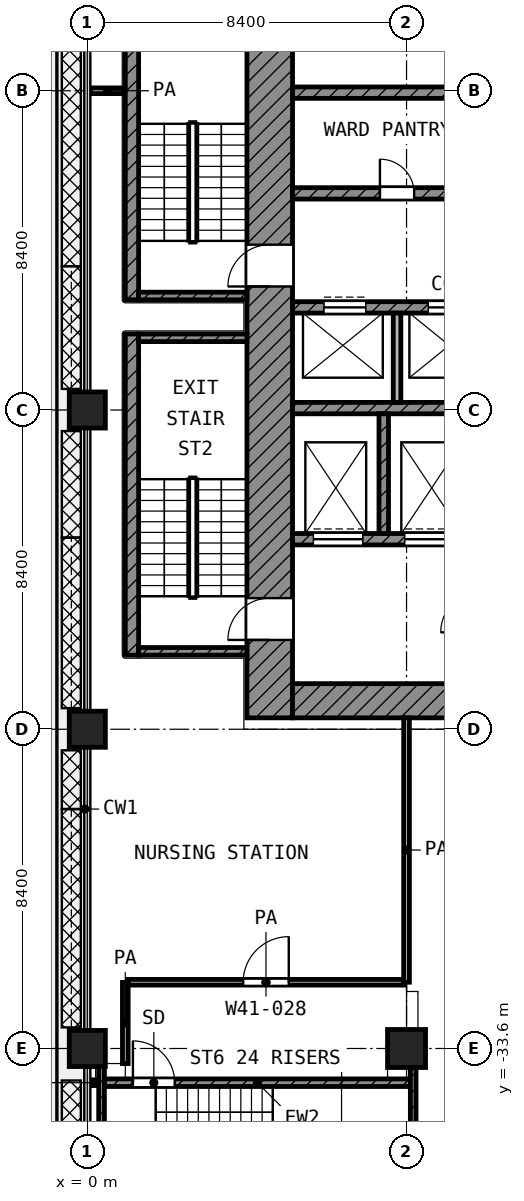
"""IFC4 building model, lengths in metres.
Left out: names, types, materials, properties, quantities, classifications, styles, units other than length and angle.
Written with IfcOpenShell. Run it as: python <this file> out.ifc"""

import sys

from ifc_helpers import new_model, si_unit, direction, frame, frame_2d, origin, origin_2d, place, context, subcontext, project, spatial, rectangle, extrude, element, fill, save


model = new_model("IFC4")
c1 = context("Model", 3, precision=1e-05, world=origin(), true_north=direction((0.0, 1.0)))
c2 = subcontext(c1, "Body", "Model", "MODEL_VIEW")
j1 = project(units=[si_unit("LENGTHUNIT", "METRE"), si_unit("PLANEANGLEUNIT", "RADIAN")], contexts=[c1])
p1 = place(None, origin())
s1 = spatial("IfcSite", under=j1, at=p1, CompositionType="ELEMENT")
p2 = place(p1, origin())
s2 = spatial("IfcBuilding", under=s1, at=p2, CompositionType="ELEMENT")
p3 = place(p2, frame((0.0, 0.0, 200.4)))
s3 = spatial("IfcBuildingStorey", under=s2, at=p3, CompositionType="ELEMENT", Elevation=200.4)
for number, where, z_axis, x_axis in (
    (1, (0.0, -16.8, 0.0), (0.0, 0.0, 1.0), (1.0, 0.0, 0.0)),
    (2, (0.0, -25.2, 0.0), (0.0, 0.0, 1.0), (1.0, 0.0, 0.0)),
    (3, (0.0, -33.6, 0.0), (0.0, 0.0, 1.0), (1.0, 0.0, 0.0)),
):
    element("IfcColumn", number, at=place(p3, frame(where, z_axis=z_axis, x_axis=x_axis)), inside=s3, PredefinedType="COLUMN", context=c2, shape_type="SweptSolid", body=[
        extrude(rectangle(XDim=0.95, YDim=0.95, at=origin_2d()), origin(), (0.0, 0.0, 1.0), 4.2),
    ])
p4 = place(p3, frame((8.4, -33.6, 0.0), z_axis=(0.0, 0.0, 1.0), x_axis=(1.0, 0.0, 0.0)))
e4 = element("IfcColumn", 4, at=p4, inside=s3, PredefinedType="COLUMN", context=c2, shape_type="SweptSolid", body=[
    extrude(rectangle(XDim=1.0, YDim=1.0, at=origin_2d()), origin(), (0.0, 0.0, 1.0), 4.2),
])
p5 = place(p3, frame((4.8, -24.9, 0.0), z_axis=(0.0, 0.0, 1.0), x_axis=(0.0, 1.0, 0.0)))
e5 = element("IfcWall", 5, at=p5, inside=s3, PredefinedType="SHEAR", context=c2, shape_type="SweptSolid", body=[
    extrude(rectangle(XDim=19.5, YDim=1.2, at=frame_2d((9.75, 0.0))), origin(), (0.0, 0.0, 1.0), 3.6),
])
p6 = place(p5, frame((11.35, 0.0, 0.0)))
e6 = element("IfcOpeningElement", 6, at=p6, cuts=e5, PredefinedType="OPENING", context=c2, shape_type="SweptSolid", body=[
    extrude(rectangle(XDim=1.1, YDim=2.1, at=frame_2d((0.55, 1.05))), frame((0.0, 0.61, 0.0), z_axis=(0.0, -1.0, 0.0), x_axis=(1.0, 0.0, 0.0)), (0.0, 0.0, 1.0), 1.22),
])
p7 = place(p5, frame((2.05, 0.0, 0.0)))
e7 = element("IfcOpeningElement", 7, at=p7, cuts=e5, PredefinedType="OPENING", context=c2, shape_type="SweptSolid", body=[
    extrude(rectangle(XDim=1.1, YDim=2.1, at=frame_2d((0.55, 1.05))), frame((0.0, 0.61, 0.0), z_axis=(0.0, -1.0, 0.0), x_axis=(1.0, 0.0, 0.0)), (0.0, 0.0, 1.0), 1.22),
])
p8 = place(p3, frame((5.4, -24.45, 0.0), z_axis=(0.0, 0.0, 1.0), x_axis=(1.0, 0.0, 0.0)))
e8 = element("IfcWall", 8, at=p8, inside=s3, PredefinedType="SHEAR", context=c2, shape_type="SweptSolid", body=[
    extrude(rectangle(XDim=18.6, YDim=0.9, at=frame_2d((9.3, 0.0))), origin(), (0.0, 0.0, 1.0), 3.6),
])
p9 = place(p8, frame((6.3, 0.0, 0.0)))
e9 = element("IfcOpeningElement", 9, at=p9, cuts=e8, PredefinedType="OPENING", context=c2, shape_type="SweptSolid", body=[
    extrude(rectangle(XDim=1.8, YDim=2.1, at=frame_2d((0.9, 1.05))), frame((0.0, 0.46, 0.0), z_axis=(0.0, -1.0, 0.0), x_axis=(1.0, 0.0, 0.0)), (0.0, 0.0, 1.0), 0.92),
])
p10 = place(p3, frame((5.4, -8.45, 0.0), z_axis=(0.0, 0.0, 1.0), x_axis=(1.0, 0.0, 0.0)))
e10 = element("IfcWall", 10, at=p10, inside=s3, PredefinedType="SHEAR", context=c2, shape_type="SweptSolid", body=[
    extrude(rectangle(XDim=16.65, YDim=0.3, at=frame_2d((8.325, 0.0))), origin(), (0.0, 0.0, 1.0), 3.6),
])
p11 = place(p3, frame((5.4, -11.1, 0.0), z_axis=(0.0, 0.0, 1.0), x_axis=(1.0, 0.0, 0.0)))
e11 = element("IfcWall", 11, at=p11, inside=s3, PredefinedType="SHEAR", context=c2, shape_type="SweptSolid", body=[
    extrude(rectangle(XDim=16.65, YDim=0.3, at=frame_2d((8.325, 0.0))), origin(), (0.0, 0.0, 1.0), 3.6),
])
p12 = place(p11, frame((11.825, 0.0, 0.0)))
e12 = element("IfcOpeningElement", 12, at=p12, cuts=e11, PredefinedType="OPENING", context=c2, shape_type="SweptSolid", body=[
    extrude(rectangle(XDim=1.1, YDim=2.1, at=frame_2d((0.55, 1.05))), frame((0.0, 0.16, 0.0), z_axis=(0.0, -1.0, 0.0), x_axis=(1.0, 0.0, 0.0)), (0.0, 0.0, 1.0), 0.32),
])
p13 = place(p11, frame((14.575, 0.0, 0.0)))
e13 = element("IfcOpeningElement", 13, at=p13, cuts=e11, PredefinedType="OPENING", context=c2, shape_type="SweptSolid", body=[
    extrude(rectangle(XDim=1.1, YDim=2.1, at=frame_2d((0.55, 1.05))), frame((0.0, 0.16, 0.0), z_axis=(0.0, -1.0, 0.0), x_axis=(1.0, 0.0, 0.0)), (0.0, 0.0, 1.0), 0.32),
])
p14 = place(p11, frame((2.3, 0.0, 0.0)))
e14 = element("IfcOpeningElement", 14, at=p14, cuts=e11, PredefinedType="OPENING", context=c2, shape_type="SweptSolid", body=[
    extrude(rectangle(XDim=0.9, YDim=2.1, at=frame_2d((0.45, 1.05))), frame((0.0, 0.16, 0.0), z_axis=(0.0, -1.0, 0.0), x_axis=(1.0, 0.0, 0.0)), (0.0, 0.0, 1.0), 0.32),
])
p15 = place(p11, frame((7.8, 0.0, 0.0)))
e15 = element("IfcOpeningElement", 15, at=p15, cuts=e11, PredefinedType="OPENING", context=c2, shape_type="SweptSolid", body=[
    extrude(rectangle(XDim=0.9, YDim=2.1, at=frame_2d((0.45, 1.05))), frame((0.0, 0.16, 0.0), z_axis=(0.0, -1.0, 0.0), x_axis=(1.0, 0.0, 0.0)), (0.0, 0.0, 1.0), 0.32),
])
p16 = place(p3, frame((5.4, -14.1, 0.0), z_axis=(0.0, 0.0, 1.0), x_axis=(1.0, 0.0, 0.0)))
e16 = element("IfcWall", 16, at=p16, inside=s3, PredefinedType="SHEAR", context=c2, shape_type="SweptSolid", body=[
    extrude(rectangle(XDim=16.65, YDim=0.3, at=frame_2d((8.325, 0.0))), origin(), (0.0, 0.0, 1.0), 3.6),
])
p17 = place(p16, frame((0.825, 0.0, 0.0)))
e17 = element("IfcOpeningElement", 17, at=p17, cuts=e16, PredefinedType="OPENING", context=c2, shape_type="SweptSolid", body=[
    extrude(rectangle(XDim=1.1, YDim=2.1, at=frame_2d((0.55, 1.05))), frame((0.0, 0.16, 0.0), z_axis=(0.0, -1.0, 0.0), x_axis=(1.0, 0.0, 0.0)), (0.0, 0.0, 1.0), 0.32),
])
p18 = place(p16, frame((3.575, 0.0, 0.0)))
e18 = element("IfcOpeningElement", 18, at=p18, cuts=e16, PredefinedType="OPENING", context=c2, shape_type="SweptSolid", body=[
    extrude(rectangle(XDim=1.1, YDim=2.1, at=frame_2d((0.55, 1.05))), frame((0.0, 0.16, 0.0), z_axis=(0.0, -1.0, 0.0), x_axis=(1.0, 0.0, 0.0)), (0.0, 0.0, 1.0), 0.32),
])
p19 = place(p3, frame((5.4, -16.75, 0.0), z_axis=(0.0, 0.0, 1.0), x_axis=(1.0, 0.0, 0.0)))
e19 = element("IfcWall", 19, at=p19, inside=s3, PredefinedType="SHEAR", context=c2, shape_type="SweptSolid", body=[
    extrude(rectangle(XDim=16.65, YDim=0.3, at=frame_2d((8.325, 0.0))), origin(), (0.0, 0.0, 1.0), 3.6),
])
p20 = place(p3, frame((5.4, -20.2, 0.0), z_axis=(0.0, 0.0, 1.0), x_axis=(1.0, 0.0, 0.0)))
e20 = element("IfcWall", 20, at=p20, inside=s3, PredefinedType="SHEAR", context=c2, shape_type="SweptSolid", body=[
    extrude(rectangle(XDim=14.65, YDim=0.3, at=frame_2d((7.325, 0.0))), origin(), (0.0, 0.0, 1.0), 3.6),
])
p21 = place(p20, frame((10.55, 0.0, 0.0)))
e21 = element("IfcOpeningElement", 21, at=p21, cuts=e20, PredefinedType="OPENING", context=c2, shape_type="SweptSolid", body=[
    extrude(rectangle(XDim=1.3, YDim=2.1, at=frame_2d((0.65, 1.05))), frame((0.0, 0.16, 0.0), z_axis=(0.0, -1.0, 0.0), x_axis=(1.0, 0.0, 0.0)), (0.0, 0.0, 1.0), 0.32),
])
p22 = place(p20, frame((12.95, 0.0, 0.0)))
e22 = element("IfcOpeningElement", 22, at=p22, cuts=e20, PredefinedType="OPENING", context=c2, shape_type="SweptSolid", body=[
    extrude(rectangle(XDim=1.3, YDim=2.1, at=frame_2d((0.65, 1.05))), frame((0.0, 0.16, 0.0), z_axis=(0.0, -1.0, 0.0), x_axis=(1.0, 0.0, 0.0)), (0.0, 0.0, 1.0), 0.32),
])
p23 = place(p20, frame((0.55, 0.0, 0.0)))
e23 = element("IfcOpeningElement", 23, at=p23, cuts=e20, PredefinedType="OPENING", context=c2, shape_type="SweptSolid", body=[
    extrude(rectangle(XDim=1.3, YDim=2.1, at=frame_2d((0.65, 1.05))), frame((0.0, 0.16, 0.0), z_axis=(0.0, -1.0, 0.0), x_axis=(1.0, 0.0, 0.0)), (0.0, 0.0, 1.0), 0.32),
])
p24 = place(p20, frame((2.95, 0.0, 0.0)))
e24 = element("IfcOpeningElement", 24, at=p24, cuts=e20, PredefinedType="OPENING", context=c2, shape_type="SweptSolid", body=[
    extrude(rectangle(XDim=1.3, YDim=2.1, at=frame_2d((0.65, 1.05))), frame((0.0, 0.16, 0.0), z_axis=(0.0, -1.0, 0.0), x_axis=(1.0, 0.0, 0.0)), (0.0, 0.0, 1.0), 0.32),
])
p25 = place(p20, frame((6.55, 0.0, 0.0)))
e25 = element("IfcOpeningElement", 25, at=p25, cuts=e20, PredefinedType="OPENING", context=c2, shape_type="SweptSolid", body=[
    extrude(rectangle(XDim=0.9, YDim=2.1, at=frame_2d((0.45, 1.05))), frame((0.0, 0.16, 0.0), z_axis=(0.0, -1.0, 0.0), x_axis=(1.0, 0.0, 0.0)), (0.0, 0.0, 1.0), 0.32),
])
p26 = place(p20, frame((8.95, 0.0, 0.0)))
e26 = element("IfcOpeningElement", 26, at=p26, cuts=e20, PredefinedType="OPENING", context=c2, shape_type="SweptSolid", body=[
    extrude(rectangle(XDim=0.9, YDim=2.1, at=frame_2d((0.45, 1.05))), frame((0.0, 0.16, 0.0), z_axis=(0.0, -1.0, 0.0), x_axis=(1.0, 0.0, 0.0)), (0.0, 0.0, 1.0), 0.32),
])
p27 = place(p3, frame((7.8, -20.05, 0.0), z_axis=(0.0, 0.0, 1.0), x_axis=(0.0, 1.0, 0.0)))
e27 = element("IfcWall", 27, at=p27, inside=s3, PredefinedType="SHEAR", context=c2, shape_type="SweptSolid", body=[
    extrude(rectangle(XDim=3.15, YDim=0.25, at=frame_2d((1.575, 0.0))), origin(), (0.0, 0.0, 1.0), 3.6),
])
p28 = place(p3, frame((8.15, -16.6, 0.0), z_axis=(0.0, 0.0, 1.0), x_axis=(0.0, 1.0, 0.0)))
e28 = element("IfcWall", 28, at=p28, inside=s3, PredefinedType="PARTITIONING", context=c2, shape_type="SweptSolid", body=[
    extrude(rectangle(XDim=2.35, YDim=0.2, at=frame_2d((1.175, 0.0))), origin(), (0.0, 0.0, 1.0), 3.6),
])
p29 = place(p3, frame((1.175, -13.9, 0.0), z_axis=(0.0, 0.0, 1.0), x_axis=(0.0, 1.0, 0.0)))
e29 = element("IfcWall", 29, at=p29, inside=s3, PredefinedType="SHEAR", context=c2, shape_type="SweptSolid", body=[
    extrude(rectangle(XDim=8.45, YDim=0.35, at=frame_2d((4.225, 0.0))), origin(), (0.0, 0.0, 1.0), 3.6),
])
p30 = place(p3, frame((1.35, -13.8, 0.0), z_axis=(0.0, 0.0, 1.0), x_axis=(1.0, 0.0, 0.0)))
e30 = element("IfcWall", 30, at=p30, inside=s3, PredefinedType="SHEAR", context=c2, shape_type="SweptSolid", body=[
    extrude(rectangle(XDim=2.85, YDim=0.2, at=frame_2d((1.425, 0.0))), origin(), (0.0, 0.0, 1.0), 3.6),
])
p31 = place(p3, frame((1.175, -23.25, 0.0), z_axis=(0.0, 0.0, 1.0), x_axis=(0.0, 1.0, 0.0)))
e31 = element("IfcWall", 31, at=p31, inside=s3, PredefinedType="SHEAR", context=c2, shape_type="SweptSolid", body=[
    extrude(rectangle(XDim=8.45, YDim=0.35, at=frame_2d((4.225, 0.0))), origin(), (0.0, 0.0, 1.0), 3.6),
])
for number, where, z_axis, x_axis in (
    (32, (1.35, -14.9, 0.0), (0.0, 0.0, 1.0), (1.0, 0.0, 0.0)),
    (33, (1.35, -23.15, 0.0), (0.0, 0.0, 1.0), (1.0, 0.0, 0.0)),
):
    element("IfcWall", number, at=place(p3, frame(where, z_axis=z_axis, x_axis=x_axis)), inside=s3, PredefinedType="SHEAR", context=c2, shape_type="SweptSolid", body=[
        extrude(rectangle(XDim=2.85, YDim=0.2, at=frame_2d((1.425, 0.0))), origin(), (0.0, 0.0, 1.0), 3.6),
    ])
p32 = place(p3, frame((0.375, -40.05, 0.0), z_axis=(0.0, 0.0, 1.0), x_axis=(0.0, 1.0, 0.0)))
e34 = element("IfcWall", 34, at=p32, inside=s3, PredefinedType="SHEAR", context=c2, shape_type="SweptSolid", body=[
    extrude(rectangle(XDim=5.975, YDim=0.15, at=frame_2d((2.988, 0.0))), origin(), (0.0, 0.0, 1.0), 3.6),
])
p33 = place(p3, frame((8.575, -40.05, 0.0), z_axis=(0.0, 0.0, 1.0), x_axis=(0.0, 1.0, 0.0)))
e35 = element("IfcWall", 35, at=p33, inside=s3, PredefinedType="SHEAR", context=c2, shape_type="SweptSolid", body=[
    extrude(rectangle(XDim=5.95, YDim=0.15, at=frame_2d((2.975, 0.0))), origin(), (0.0, 0.0, 1.0), 3.6),
])
p34 = place(p3, frame((0.45, -34.5, 0.0), z_axis=(0.0, 0.0, 1.0), x_axis=(1.0, 0.0, 0.0)))
e36 = element("IfcWall", 36, at=p34, inside=s3, PredefinedType="SHEAR", context=c2, shape_type="SweptSolid", body=[
    extrude(rectangle(XDim=8.05, YDim=0.2, at=frame_2d((4.025, 0.0))), origin(), (0.0, 0.0, 1.0), 3.6),
])
p35 = place(p34, frame((0.75, 0.0, 0.0)))
e37 = element("IfcOpeningElement", 37, at=p35, cuts=e36, PredefinedType="OPENING", context=c2, shape_type="SweptSolid", body=[
    extrude(rectangle(XDim=1.1, YDim=2.1, at=frame_2d((0.55, 1.05))), frame((0.0, 0.11, 0.0), z_axis=(0.0, -1.0, 0.0), x_axis=(1.0, 0.0, 0.0)), (0.0, 0.0, 1.0), 0.22),
])
p36 = place(p3, frame((0.08, -34.5, 0.0), z_axis=(0.0, 0.0, 1.0), x_axis=(1.0, 0.0, 0.0)))
e38 = element("IfcWall", 38, at=p36, inside=s3, PredefinedType="PARTITIONING", context=c2, shape_type="SweptSolid", body=[
    extrude(rectangle(XDim=0.19, YDim=0.15, at=frame_2d((0.095, 0.0))), origin(), (0.0, 0.0, 1.0), 3.6),
])
p37 = place(p3, frame((1.077, -31.857, 0.0), z_axis=(0.0, 0.0, 1.0), x_axis=(1.0, 0.0, 0.0)))
e39 = element("IfcWall", 39, at=p37, inside=s3, PredefinedType="PARTITIONING", context=c2, shape_type="SweptSolid", body=[
    extrude(rectangle(XDim=7.248, YDim=0.15, at=frame_2d((3.624, 0.0))), origin(), (0.0, 0.0, 1.0), 3.6),
])
p38 = place(p37, frame((3.024, 0.0, 0.0)))
e40 = element("IfcOpeningElement", 40, at=p38, cuts=e39, PredefinedType="OPENING", context=c2, shape_type="SweptSolid", body=[
    extrude(rectangle(XDim=1.2, YDim=2.1, at=frame_2d((0.6, 1.05))), frame((0.0, 0.085, 0.0), z_axis=(0.0, -1.0, 0.0), x_axis=(1.0, 0.0, 0.0)), (0.0, 0.0, 1.0), 0.17),
])
p39 = place(p3, frame((0.08, -8.4, 0.0), z_axis=(0.0, 0.0, 1.0), x_axis=(1.0, 0.0, 0.0)))
e41 = element("IfcWall", 41, at=p39, inside=s3, PredefinedType="PARTITIONING", context=c2, shape_type="SweptSolid", body=[
    extrude(rectangle(XDim=0.89, YDim=0.15, at=frame_2d((0.445, 0.0))), origin(), (0.0, 0.0, 1.0), 3.6),
])
p40 = place(p3, frame((1.0, -33.997, 0.0), z_axis=(0.0, 0.0, 1.0), x_axis=(0.0, 1.0, 0.0)))
e42 = element("IfcWall", 42, at=p40, inside=s3, PredefinedType="PARTITIONING", context=c2, shape_type="SweptSolid", body=[
    extrude(rectangle(XDim=2.136, YDim=0.15, at=frame_2d((1.068, 0.0))), origin(), (0.0, 0.0, 1.0), 3.6),
])
p41 = place(p3, frame((8.4, -31.857, 0.0), z_axis=(0.0, 0.0, 1.0), x_axis=(0.0, 1.0, 0.0)))
e43 = element("IfcWall", 43, at=p41, inside=s3, PredefinedType="PARTITIONING", context=c2, shape_type="SweptSolid", body=[
    extrude(rectangle(XDim=6.957, YDim=0.15, at=frame_2d((3.479, 0.0))), origin(), (0.0, 0.0, 1.0), 3.6),
])
p42 = place(p17, origin())
e44 = element("IfcDoor", 44, at=p42, inside=s3, OperationType="DOUBLE_DOOR_SLIDING", PredefinedType="DOOR", context=c2, shape_type="SweptSolid", body=[
    extrude(rectangle(XDim=1.1, YDim=2.1, at=frame_2d((0.55, 1.05))), frame((0.0, 0.025, 0.0), z_axis=(0.0, -1.0, 0.0), x_axis=(1.0, 0.0, 0.0)), (0.0, 0.0, 1.0), 0.05),
])
fill(e17, e44)
p43 = place(p18, origin())
e45 = element("IfcDoor", 45, at=p43, inside=s3, OperationType="DOUBLE_DOOR_SLIDING", PredefinedType="DOOR", context=c2, shape_type="SweptSolid", body=[
    extrude(rectangle(XDim=1.1, YDim=2.1, at=frame_2d((0.55, 1.05))), frame((0.0, 0.025, 0.0), z_axis=(0.0, -1.0, 0.0), x_axis=(1.0, 0.0, 0.0)), (0.0, 0.0, 1.0), 0.05),
])
fill(e18, e45)
p44 = place(p23, origin())
e46 = element("IfcDoor", 46, at=p44, inside=s3, OperationType="DOUBLE_DOOR_SLIDING", PredefinedType="DOOR", context=c2, shape_type="SweptSolid", body=[
    extrude(rectangle(XDim=1.3, YDim=2.1, at=frame_2d((0.65, 1.05))), frame((0.0, 0.025, 0.0), z_axis=(0.0, -1.0, 0.0), x_axis=(1.0, 0.0, 0.0)), (0.0, 0.0, 1.0), 0.05),
])
fill(e23, e46)
p45 = place(p24, origin())
e47 = element("IfcDoor", 47, at=p45, inside=s3, OperationType="DOUBLE_DOOR_SLIDING", PredefinedType="DOOR", context=c2, shape_type="SweptSolid", body=[
    extrude(rectangle(XDim=1.3, YDim=2.1, at=frame_2d((0.65, 1.05))), frame((0.0, 0.025, 0.0), z_axis=(0.0, -1.0, 0.0), x_axis=(1.0, 0.0, 0.0)), (0.0, 0.0, 1.0), 0.05),
])
fill(e24, e47)
p46 = place(p6, origin())
e48 = element("IfcDoor", 48, at=p46, inside=s3, OperationType="SINGLE_SWING_LEFT", PredefinedType="DOOR", context=c2, shape_type="SweptSolid", body=[
    extrude(rectangle(XDim=1.1, YDim=2.1, at=frame_2d((0.55, 1.05))), frame((0.0, 0.025, 0.0), z_axis=(0.0, -1.0, 0.0), x_axis=(1.0, 0.0, 0.0)), (0.0, 0.0, 1.0), 0.05),
])
fill(e6, e48)
p47 = place(p7, origin())
e49 = element("IfcDoor", 49, at=p47, inside=s3, OperationType="SINGLE_SWING_LEFT", PredefinedType="DOOR", context=c2, shape_type="SweptSolid", body=[
    extrude(rectangle(XDim=1.1, YDim=2.1, at=frame_2d((0.55, 1.05))), frame((0.0, 0.025, 0.0), z_axis=(0.0, -1.0, 0.0), x_axis=(1.0, 0.0, 0.0)), (0.0, 0.0, 1.0), 0.05),
])
fill(e7, e49)
p48 = place(p14, origin())
e50 = element("IfcDoor", 50, at=p48, inside=s3, OperationType="SINGLE_SWING_LEFT", PredefinedType="DOOR", context=c2, shape_type="SweptSolid", body=[
    extrude(rectangle(XDim=0.9, YDim=2.1, at=frame_2d((0.45, 1.05))), frame((0.0, 0.025, 0.0), z_axis=(0.0, -1.0, 0.0), x_axis=(1.0, 0.0, 0.0)), (0.0, 0.0, 1.0), 0.05),
])
fill(e14, e50)
p49 = place(p35, origin())
e51 = element("IfcDoor", 51, at=p49, inside=s3, OperationType="SINGLE_SWING_LEFT", PredefinedType="DOOR", context=c2, shape_type="SweptSolid", body=[
    extrude(rectangle(XDim=1.1, YDim=2.1, at=frame_2d((0.55, 1.05))), frame((0.0, 0.025, 0.0), z_axis=(0.0, -1.0, 0.0), x_axis=(1.0, 0.0, 0.0)), (0.0, 0.0, 1.0), 0.05),
])
fill(e37, e51)
p50 = place(p38, origin())
e52 = element("IfcDoor", 52, at=p50, inside=s3, OperationType="SINGLE_SWING_RIGHT", PredefinedType="DOOR", context=c2, shape_type="SweptSolid", body=[
    extrude(rectangle(XDim=1.2, YDim=2.1, at=frame_2d((0.6, 1.05))), frame((0.0, 0.025, 0.0), z_axis=(0.0, -1.0, 0.0), x_axis=(1.0, 0.0, 0.0)), (0.0, 0.0, 1.0), 0.05),
])
fill(e40, e52)
save(model, sys.argv[1])
